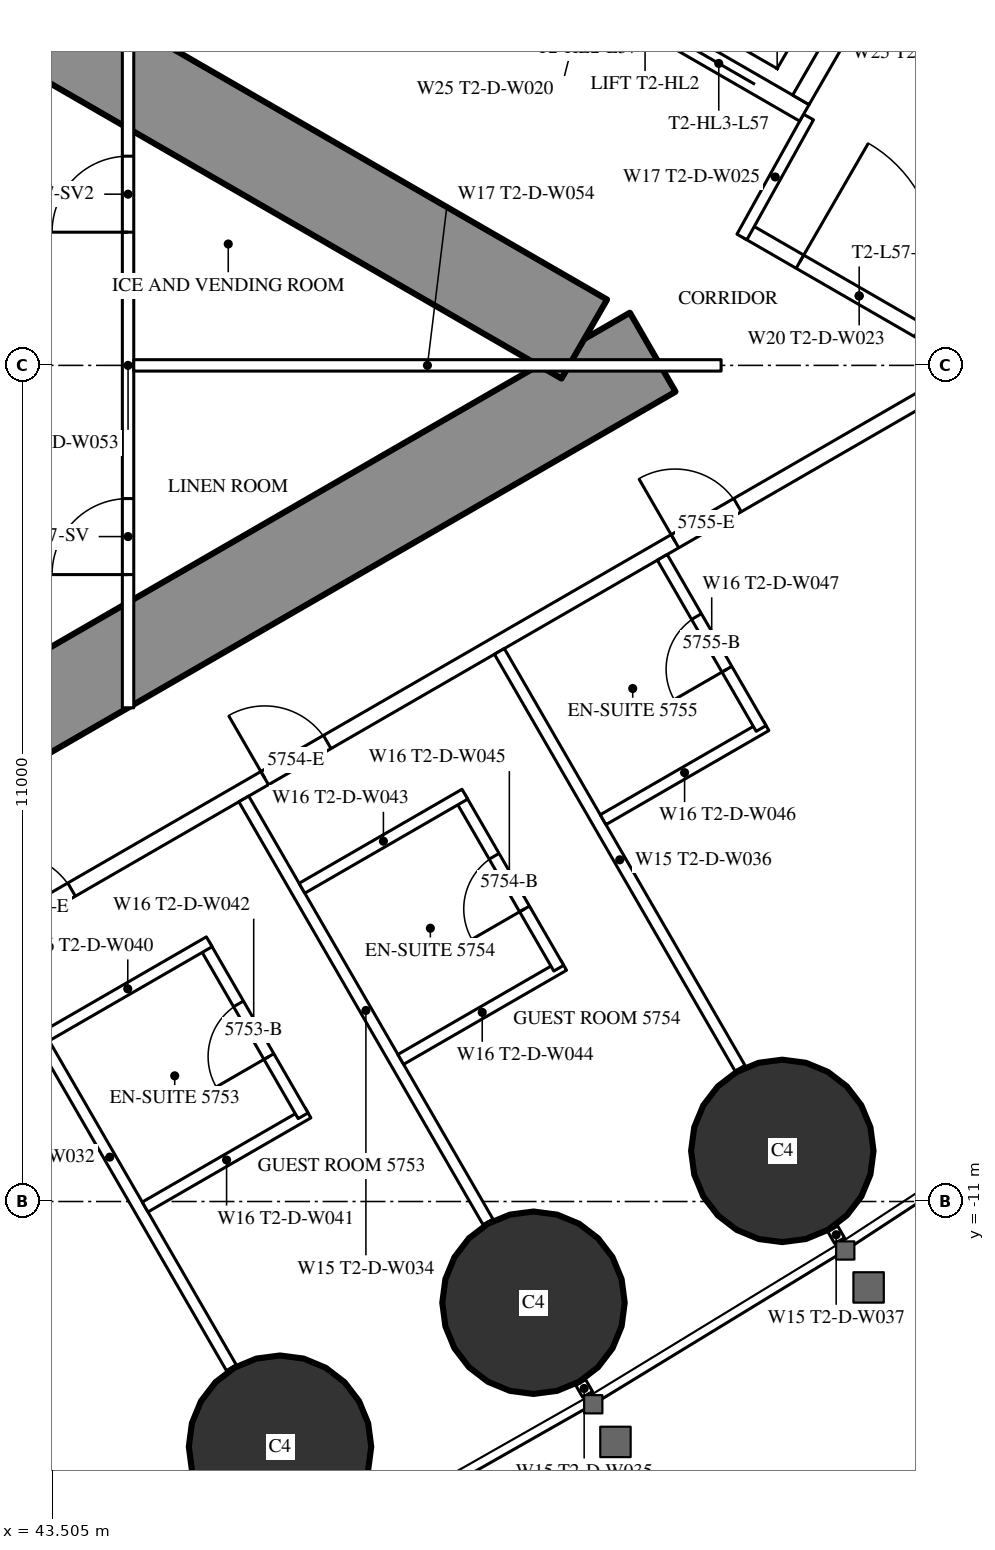
"""IFC4 building model, lengths in metres.
Left out: names, types, materials, properties, quantities, classifications, styles, units other than length and angle.
Written with IfcOpenShell. Run it as: python <this file> out.ifc"""

import sys

from ifc_helpers import new_model, si_unit, direction, frame, frame_2d, origin, origin_2d, place, context, subcontext, project, spatial, rectangle, circle, extrude, element, fill, save


model = new_model("IFC4")
c1 = context("Model", 3, precision=1e-05, world=origin(), true_north=direction((0.0, 1.0)))
c2 = subcontext(c1, "Body", "Model", "MODEL_VIEW")
j1 = project(units=[si_unit("LENGTHUNIT", "METRE"), si_unit("PLANEANGLEUNIT", "RADIAN")], contexts=[c1])
p1 = place(None, origin())
s1 = spatial("IfcSite", under=j1, at=p1, CompositionType="ELEMENT")
p2 = place(p1, origin())
s2 = spatial("IfcBuilding", under=s1, at=p2, CompositionType="ELEMENT")
p3 = place(p2, frame((0.0, 0.0, 215.3)))
s3 = spatial("IfcBuildingStorey", under=s2, at=p3, CompositionType="ELEMENT", Elevation=215.3)
for number, where, z_axis, x_axis in (
    (1, (46.499, -14.226, 0.0), (0.0, 0.0, 1.0), (1.0, 0.0, 0.0)),
    (2, (49.834, -12.332, 0.0), (0.0, 0.0, 1.0), (1.0, 0.0, 0.0)),
    (3, (53.108, -10.334, 0.0), (0.0, 0.0, 1.0), (1.0, 0.0, 0.0)),
):
    element("IfcColumn", number, at=place(p3, frame(where, z_axis=z_axis, x_axis=x_axis)), inside=s3, PredefinedType="COLUMN", context=c2, shape_type="SweptSolid", body=[
        extrude(circle(Radius=1.2, at=origin_2d()), origin(), (0.0, 0.0, 1.0), 3.6),
    ])
p4 = place(p3, frame((27.2, -13.8, 0.0), z_axis=(0.0, 0.0, 1.0), x_axis=(0.866027159892, 0.499996958321, 0.0)))
e4 = element("IfcWall", 4, at=p4, inside=s3, PredefinedType="SHEAR", context=c2, shape_type="SweptSolid", body=[
    extrude(rectangle(XDim=27.947, YDim=1.2, at=frame_2d((13.973, 0.0))), origin(), (0.0, 0.0, 1.0), 3.6),
])
p5 = place(p4, frame((4.6, 0.0, 0.0)))
e5 = element("IfcOpeningElement", 5, at=p5, cuts=e4, PredefinedType="OPENING", context=c2, shape_type="SweptSolid", body=[
    extrude(rectangle(XDim=1.0, YDim=2.2, at=frame_2d((0.5, 1.1))), frame((0.0, 0.61, 0.0), z_axis=(0.0, -1.0, 0.0), x_axis=(1.0, 0.0, 0.0)), (0.0, 0.0, 1.0), 1.22),
])
p6 = place(p4, frame((13.395, 0.0, 0.0)))
e6 = element("IfcOpeningElement", 6, at=p6, cuts=e4, PredefinedType="OPENING", context=c2, shape_type="SweptSolid", body=[
    extrude(rectangle(XDim=1.8, YDim=2.2, at=frame_2d((0.9, 1.1))), frame((0.0, 0.61, 0.0), z_axis=(0.0, -1.0, 0.0), x_axis=(1.0, 0.0, 0.0)), (0.0, 0.0, 1.0), 1.22),
])
p7 = place(p3, frame((27.2, 13.8, 0.0), z_axis=(0.0, 0.0, 1.0), x_axis=(0.866024515034, -0.500001539357, 0.0)))
e7 = element("IfcWall", 7, at=p7, inside=s3, PredefinedType="SHEAR", context=c2, shape_type="SweptSolid", body=[
    extrude(rectangle(XDim=26.907, YDim=1.2, at=frame_2d((13.454, 0.0))), origin(), (0.0, 0.0, 1.0), 3.6),
])
p8 = place(p7, frame((4.6, 0.0, 0.0)))
e8 = element("IfcOpeningElement", 8, at=p8, cuts=e7, PredefinedType="OPENING", context=c2, shape_type="SweptSolid", body=[
    extrude(rectangle(XDim=1.0, YDim=2.2, at=frame_2d((0.5, 1.1))), frame((0.0, 0.61, 0.0), z_axis=(0.0, -1.0, 0.0), x_axis=(1.0, 0.0, 0.0)), (0.0, 0.0, 1.0), 1.22),
])
p9 = place(p7, frame((13.395, 0.0, 0.0)))
e9 = element("IfcOpeningElement", 9, at=p9, cuts=e7, PredefinedType="OPENING", context=c2, shape_type="SweptSolid", body=[
    extrude(rectangle(XDim=1.8, YDim=2.2, at=frame_2d((0.9, 1.1))), frame((0.0, 0.61, 0.0), z_axis=(0.0, -1.0, 0.0), x_axis=(1.0, 0.0, 0.0)), (0.0, 0.0, 1.0), 1.22),
])
p10 = place(p3, frame((28.959, -15.44, 0.0), z_axis=(0.0, 0.0, 1.0), x_axis=(0.866025227435, 0.500000305447, 0.0)))
e10 = element("IfcWall", 10, at=p10, inside=s3, PredefinedType="PARTITIONING", context=c2, shape_type="SweptSolid", body=[
    extrude(rectangle(XDim=30.88, YDim=0.2, at=frame_2d((15.44, 0.0))), origin(), (0.0, 0.0, 1.0), 3.35),
])
p11 = place(p10, frame((0.494, 0.0, 0.0)))
e11 = element("IfcOpeningElement", 11, at=p11, cuts=e10, PredefinedType="OPENING", context=c2, shape_type="SweptSolid", body=[
    extrude(rectangle(XDim=1.8, YDim=2.2, at=frame_2d((0.9, 1.1))), frame((0.0, 0.11, 0.0), z_axis=(0.0, -1.0, 0.0), x_axis=(1.0, 0.0, 0.0)), (0.0, 0.0, 1.0), 0.22),
])
p12 = place(p10, frame((7.687, 0.0, 0.0)))
e12 = element("IfcOpeningElement", 12, at=p12, cuts=e10, PredefinedType="OPENING", context=c2, shape_type="SweptSolid", body=[
    extrude(rectangle(XDim=1.0, YDim=2.2, at=frame_2d((0.5, 1.1))), frame((0.0, 0.11, 0.0), z_axis=(0.0, -1.0, 0.0), x_axis=(1.0, 0.0, 0.0)), (0.0, 0.0, 1.0), 0.22),
])
p13 = place(p10, frame((16.137, 0.0, 0.0)))
e13 = element("IfcOpeningElement", 13, at=p13, cuts=e10, PredefinedType="OPENING", context=c2, shape_type="SweptSolid", body=[
    extrude(rectangle(XDim=0.95, YDim=2.2, at=frame_2d((0.475, 1.1))), frame((0.0, 0.11, 0.0), z_axis=(0.0, -1.0, 0.0), x_axis=(1.0, 0.0, 0.0)), (0.0, 0.0, 1.0), 0.22),
])
p14 = place(p10, frame((20.021, 0.0, 0.0)))
e14 = element("IfcOpeningElement", 14, at=p14, cuts=e10, PredefinedType="OPENING", context=c2, shape_type="SweptSolid", body=[
    extrude(rectangle(XDim=0.95, YDim=2.2, at=frame_2d((0.475, 1.1))), frame((0.0, 0.11, 0.0), z_axis=(0.0, -1.0, 0.0), x_axis=(1.0, 0.0, 0.0)), (0.0, 0.0, 1.0), 0.22),
])
p15 = place(p10, frame((26.253, 0.0, 0.0)))
e15 = element("IfcOpeningElement", 15, at=p15, cuts=e10, PredefinedType="OPENING", context=c2, shape_type="SweptSolid", body=[
    extrude(rectangle(XDim=0.95, YDim=2.2, at=frame_2d((0.475, 1.1))), frame((0.0, 0.11, 0.0), z_axis=(0.0, -1.0, 0.0), x_axis=(1.0, 0.0, 0.0)), (0.0, 0.0, 1.0), 0.22),
])
p16 = place(p3, frame((42.66, -7.646, 0.0), z_axis=(0.0, 0.0, 1.0), x_axis=(0.499996592859, -0.866027370889, 0.0)))
e16 = element("IfcWall", 16, at=p16, inside=s3, PredefinedType="PARTITIONING", context=c2, shape_type="SweptSolid", body=[
    extrude(rectangle(XDim=6.398, YDim=0.15, at=frame_2d((3.199, 0.0))), origin(), (0.0, 0.0, 1.0), 2.45),
])
p17 = place(p3, frame((46.023, -5.704, 0.0), z_axis=(0.0, 0.0, 1.0), x_axis=(0.499984478165, -0.866034365135, 0.0)))
e17 = element("IfcWall", 17, at=p17, inside=s3, PredefinedType="PARTITIONING", context=c2, shape_type="SweptSolid", body=[
    extrude(rectangle(XDim=6.426, YDim=0.15, at=frame_2d((3.213, 0.0))), origin(), (0.0, 0.0, 1.0), 2.45),
])
p18 = place(p3, frame((50.456, -13.382, 0.0), z_axis=(0.0, 0.0, 1.0), x_axis=(0.500661834965, -0.865642955848, 0.0)))
e18 = element("IfcWall", 18, at=p18, inside=s3, PredefinedType="PARTITIONING", context=c2, shape_type="SweptSolid", body=[
    extrude(rectangle(XDim=0.18, YDim=0.15, at=frame_2d((0.09, 0.0))), origin(), (0.0, 0.0, 1.0), 2.45),
])
p19 = place(p3, frame((49.385, -3.763, 0.0), z_axis=(0.0, 0.0, 1.0), x_axis=(0.499999447814, -0.866025722589, 0.0)))
e19 = element("IfcWall", 19, at=p19, inside=s3, PredefinedType="PARTITIONING", context=c2, shape_type="SweptSolid", body=[
    extrude(rectangle(XDim=6.333, YDim=0.15, at=frame_2d((3.166, 0.0))), origin(), (0.0, 0.0, 1.0), 2.45),
])
p20 = place(p3, frame((53.771, -11.36, 0.0), z_axis=(0.0, 0.0, 1.0), x_axis=(0.499524978789, -0.866299483762, 0.0)))
e20 = element("IfcWall", 20, at=p20, inside=s3, PredefinedType="PARTITIONING", context=c2, shape_type="SweptSolid", body=[
    extrude(rectangle(XDim=0.178, YDim=0.15, at=frame_2d((0.089, 0.0))), origin(), (0.0, 0.0, 1.0), 2.45),
])
p21 = place(p3, frame((52.639, 1.769, 0.0), z_axis=(0.0, 0.0, 1.0), x_axis=(0.866027340901, -0.4999966448, 0.0)))
e21 = element("IfcWall", 21, at=p21, inside=s3, PredefinedType="PARTITIONING", context=c2, shape_type="SweptSolid", body=[
    extrude(rectangle(XDim=3.417, YDim=0.2, at=frame_2d((1.708, 0.0))), origin(), (0.0, 0.0, 1.0), 3.35),
])
p22 = place(p21, frame((0.809, 0.0, 0.0)))
e22 = element("IfcOpeningElement", 22, at=p22, cuts=e21, PredefinedType="OPENING", context=c2, shape_type="SweptSolid", body=[
    extrude(rectangle(XDim=1.8, YDim=2.2, at=frame_2d((0.9, 1.1))), frame((0.0, 0.11, 0.0), z_axis=(0.0, -1.0, 0.0), x_axis=(1.0, 0.0, 0.0)), (0.0, 0.0, 1.0), 0.22),
])
p23 = place(p3, frame((52.576, 1.689, 0.0), z_axis=(0.0, 0.0, 1.0), x_axis=(0.485424724123, 0.874278466629, 0.0)))
e23 = element("IfcWall", 23, at=p23, inside=s3, PredefinedType="PARTITIONING", context=c2, shape_type="SweptSolid", body=[
    extrude(rectangle(XDim=1.805, YDim=0.15, at=frame_2d((0.903, 0.0))), origin(), (0.0, 0.0, 1.0), 3.35),
])
p24 = place(p3, frame((44.725, -11.072, 0.0), z_axis=(0.0, 0.0, 1.0), x_axis=(0.866006523861, 0.500032699561, 0.0)))
e24 = element("IfcWall", 24, at=p24, inside=s3, PredefinedType="PARTITIONING", context=c2, shape_type="SweptSolid", body=[
    extrude(rectangle(XDim=2.475, YDim=0.15, at=frame_2d((1.237, 0.0))), origin(), (0.0, 0.0, 1.0), 3.35),
])
p25 = place(p3, frame((45.503, -7.621, 0.0), z_axis=(0.0, 0.0, 1.0), x_axis=(0.500006934395, -0.866021400173, 0.0)))
e25 = element("IfcWall", 25, at=p25, inside=s3, PredefinedType="PARTITIONING", context=c2, shape_type="SweptSolid", body=[
    extrude(rectangle(XDim=2.6, YDim=0.15, at=frame_2d((1.3, 0.0))), origin(), (0.0, 0.0, 1.0), 3.35),
])
p26 = place(p25, frame((0.9, 0.0, 0.0)))
e26 = element("IfcOpeningElement", 26, at=p26, cuts=e25, PredefinedType="OPENING", context=c2, shape_type="SweptSolid", body=[
    extrude(rectangle(XDim=0.8, YDim=2.2, at=frame_2d((0.4, 1.1))), frame((0.0, 0.085, 0.0), z_axis=(0.0, -1.0, 0.0), x_axis=(1.0, 0.0, 0.0)), (0.0, 0.0, 1.0), 0.17),
])
for number, where, z_axis, x_axis in (
    (27, (43.425, -8.821, 0.0), (0.0, 0.0, 1.0), (0.866, 0.5, 0.0)),
    (28, (48.088, -9.13, 0.0), (0.0, 0.0, 1.0), (0.866, 0.5, 0.0)),
):
    element("IfcWall", number, at=place(p3, frame(where, z_axis=z_axis, x_axis=x_axis)), inside=s3, PredefinedType="PARTITIONING", context=c2, shape_type="SweptSolid", body=[
        extrude(rectangle(XDim=2.475, YDim=0.15, at=frame_2d((1.237, 0.0))), origin(), (0.0, 0.0, 1.0), 3.35),
    ])
p27 = place(p3, frame((48.866, -5.679, 0.0), z_axis=(0.0, 0.0, 1.0), x_axis=(0.500006934395, -0.866021400173, 0.0)))
e29 = element("IfcWall", 29, at=p27, inside=s3, PredefinedType="PARTITIONING", context=c2, shape_type="SweptSolid", body=[
    extrude(rectangle(XDim=2.6, YDim=0.15, at=frame_2d((1.3, 0.0))), origin(), (0.0, 0.0, 1.0), 3.35),
])
p28 = place(p27, frame((0.9, 0.0, 0.0)))
e30 = element("IfcOpeningElement", 30, at=p28, cuts=e29, PredefinedType="OPENING", context=c2, shape_type="SweptSolid", body=[
    extrude(rectangle(XDim=0.8, YDim=2.2, at=frame_2d((0.4, 1.1))), frame((0.0, 0.085, 0.0), z_axis=(0.0, -1.0, 0.0), x_axis=(1.0, 0.0, 0.0)), (0.0, 0.0, 1.0), 0.17),
])
p29 = place(p3, frame((46.788, -6.879, 0.0), z_axis=(0.0, 0.0, 1.0), x_axis=(0.866006523861, 0.500032699561, 0.0)))
e31 = element("IfcWall", 31, at=p29, inside=s3, PredefinedType="PARTITIONING", context=c2, shape_type="SweptSolid", body=[
    extrude(rectangle(XDim=2.475, YDim=0.15, at=frame_2d((1.237, 0.0))), origin(), (0.0, 0.0, 1.0), 3.35),
])
p30 = place(p3, frame((50.75, -5.977, 0.0), z_axis=(0.0, 0.0, 1.0), x_axis=(0.866031185235, 0.4999899861, 0.0)))
e32 = element("IfcWall", 32, at=p30, inside=s3, PredefinedType="PARTITIONING", context=c2, shape_type="SweptSolid", body=[
    extrude(rectangle(XDim=2.475, YDim=0.15, at=frame_2d((1.238, 0.0))), origin(), (0.0, 0.0, 1.0), 3.35),
])
p31 = place(p3, frame((51.529, -2.525, 0.0), z_axis=(0.0, 0.0, 1.0), x_axis=(0.500006934395, -0.866021400173, 0.0)))
e33 = element("IfcWall", 33, at=p31, inside=s3, PredefinedType="PARTITIONING", context=c2, shape_type="SweptSolid", body=[
    extrude(rectangle(XDim=2.6, YDim=0.15, at=frame_2d((1.3, 0.0))), origin(), (0.0, 0.0, 1.0), 3.35),
])
p32 = place(p31, frame((0.9, 0.0, 0.0)))
e34 = element("IfcOpeningElement", 34, at=p32, cuts=e33, PredefinedType="OPENING", context=c2, shape_type="SweptSolid", body=[
    extrude(rectangle(XDim=0.8, YDim=2.2, at=frame_2d((0.4, 1.1))), frame((0.0, 0.085, 0.0), z_axis=(0.0, -1.0, 0.0), x_axis=(1.0, 0.0, 0.0)), (0.0, 0.0, 1.0), 0.17),
])
p33 = place(p3, frame((44.5, -4.505, 0.0), z_axis=(0.0, 0.0, 1.0), x_axis=(0.0, 1.0, 0.0)))
e35 = element("IfcWall", 35, at=p33, inside=s3, PredefinedType="PARTITIONING", context=c2, shape_type="SweptSolid", body=[
    extrude(rectangle(XDim=9.009, YDim=0.15, at=frame_2d((4.505, 0.0))), origin(), (0.0, 0.0, 1.0), 3.35),
])
p34 = place(p33, frame((1.752, 0.0, 0.0)))
e36 = element("IfcOpeningElement", 36, at=p34, cuts=e35, PredefinedType="OPENING", context=c2, shape_type="SweptSolid", body=[
    extrude(rectangle(XDim=1.0, YDim=2.2, at=frame_2d((0.5, 1.1))), frame((0.0, 0.085, 0.0), z_axis=(0.0, -1.0, 0.0), x_axis=(1.0, 0.0, 0.0)), (0.0, 0.0, 1.0), 0.17),
])
p35 = place(p33, frame((6.257, 0.0, 0.0)))
e37 = element("IfcOpeningElement", 37, at=p35, cuts=e35, PredefinedType="OPENING", context=c2, shape_type="SweptSolid", body=[
    extrude(rectangle(XDim=1.0, YDim=2.2, at=frame_2d((0.5, 1.1))), frame((0.0, 0.085, 0.0), z_axis=(0.0, -1.0, 0.0), x_axis=(1.0, 0.0, 0.0)), (0.0, 0.0, 1.0), 0.17),
])
p36 = place(p3, frame((44.575, 0.0, 0.0), z_axis=(0.0, 0.0, 1.0), x_axis=(1.0, 0.0, 0.0)))
e38 = element("IfcWall", 38, at=p36, inside=s3, PredefinedType="PARTITIONING", context=c2, shape_type="SweptSolid", body=[
    extrude(rectangle(XDim=7.727, YDim=0.15, at=frame_2d((3.864, 0.0))), origin(), (0.0, 0.0, 1.0), 2.45),
])
p37 = place(p3, frame((47.681, 6.622, 0.0), z_axis=(0.0, 0.0, 1.0), x_axis=(0.86603344179, -0.499986077507, 0.0)))
e39 = element("IfcWall", 39, at=p37, inside=s3, PredefinedType="PARTITIONING", context=c2, shape_type="SweptSolid", body=[
    extrude(rectangle(XDim=6.6, YDim=0.25, at=frame_2d((3.3, 0.0))), origin(), (0.0, 0.0, 1.0), 3.35),
])
p38 = place(p37, frame((0.75, 0.0, 0.0)))
e40 = element("IfcOpeningElement", 40, at=p38, cuts=e39, PredefinedType="OPENING", context=c2, shape_type="SweptSolid", body=[
    extrude(rectangle(XDim=1.1, YDim=2.2, at=frame_2d((0.55, 1.1))), frame((0.0, 0.135, 0.0), z_axis=(0.0, -1.0, 0.0), x_axis=(1.0, 0.0, 0.0)), (0.0, 0.0, 1.0), 0.27),
])
p39 = place(p37, frame((2.75, 0.0, 0.0)))
e41 = element("IfcOpeningElement", 41, at=p39, cuts=e39, PredefinedType="OPENING", context=c2, shape_type="SweptSolid", body=[
    extrude(rectangle(XDim=1.1, YDim=2.2, at=frame_2d((0.55, 1.1))), frame((0.0, 0.135, 0.0), z_axis=(0.0, -1.0, 0.0), x_axis=(1.0, 0.0, 0.0)), (0.0, 0.0, 1.0), 0.27),
])
p40 = place(p37, frame((4.75, 0.0, 0.0)))
e42 = element("IfcOpeningElement", 42, at=p40, cuts=e39, PredefinedType="OPENING", context=c2, shape_type="SweptSolid", body=[
    extrude(rectangle(XDim=1.1, YDim=2.2, at=frame_2d((0.55, 1.1))), frame((0.0, 0.135, 0.0), z_axis=(0.0, -1.0, 0.0), x_axis=(1.0, 0.0, 0.0)), (0.0, 0.0, 1.0), 0.27),
])
p41 = place(p3, frame((53.352, 3.493, 0.0), z_axis=(0.0, 0.0, 1.0), x_axis=(0.499872130319, 0.866099216793, 0.0)))
e43 = element("IfcWall", 43, at=p41, inside=s3, PredefinedType="PARTITIONING", context=c2, shape_type="SweptSolid", body=[
    extrude(rectangle(XDim=3.2, YDim=0.25, at=frame_2d((1.6, 0.0))), origin(), (0.0, 0.0, 1.0), 3.35),
])
p42 = place(p26, origin())
e44 = element("IfcDoor", 44, at=p42, inside=s3, OperationType="SINGLE_SWING_RIGHT", PredefinedType="DOOR", context=c2, shape_type="SweptSolid", body=[
    extrude(rectangle(XDim=0.8, YDim=2.2, at=frame_2d((0.4, 1.1))), frame((0.0, 0.025, 0.0), z_axis=(0.0, -1.0, 0.0), x_axis=(1.0, 0.0, 0.0)), (0.0, 0.0, 1.0), 0.05),
])
fill(e26, e44)
p43 = place(p13, origin())
e45 = element("IfcDoor", 45, at=p43, inside=s3, OperationType="SINGLE_SWING_LEFT", PredefinedType="DOOR", context=c2, shape_type="SweptSolid", body=[
    extrude(rectangle(XDim=0.95, YDim=2.2, at=frame_2d((0.475, 1.1))), frame((0.0, 0.025, 0.0), z_axis=(0.0, -1.0, 0.0), x_axis=(1.0, 0.0, 0.0)), (0.0, 0.0, 1.0), 0.05),
])
fill(e13, e45)
p44 = place(p28, origin())
e46 = element("IfcDoor", 46, at=p44, inside=s3, OperationType="SINGLE_SWING_RIGHT", PredefinedType="DOOR", context=c2, shape_type="SweptSolid", body=[
    extrude(rectangle(XDim=0.8, YDim=2.2, at=frame_2d((0.4, 1.1))), frame((0.0, 0.025, 0.0), z_axis=(0.0, -1.0, 0.0), x_axis=(1.0, 0.0, 0.0)), (0.0, 0.0, 1.0), 0.05),
])
fill(e30, e46)
p45 = place(p14, origin())
e47 = element("IfcDoor", 47, at=p45, inside=s3, OperationType="SINGLE_SWING_LEFT", PredefinedType="DOOR", context=c2, shape_type="SweptSolid", body=[
    extrude(rectangle(XDim=0.95, YDim=2.2, at=frame_2d((0.475, 1.1))), frame((0.0, 0.025, 0.0), z_axis=(0.0, -1.0, 0.0), x_axis=(1.0, 0.0, 0.0)), (0.0, 0.0, 1.0), 0.05),
])
fill(e14, e47)
p46 = place(p32, origin())
e48 = element("IfcDoor", 48, at=p46, inside=s3, OperationType="SINGLE_SWING_RIGHT", PredefinedType="DOOR", context=c2, shape_type="SweptSolid", body=[
    extrude(rectangle(XDim=0.8, YDim=2.2, at=frame_2d((0.4, 1.1))), frame((0.0, 0.025, 0.0), z_axis=(0.0, -1.0, 0.0), x_axis=(1.0, 0.0, 0.0)), (0.0, 0.0, 1.0), 0.05),
])
fill(e34, e48)
p47 = place(p15, origin())
e49 = element("IfcDoor", 49, at=p47, inside=s3, OperationType="SINGLE_SWING_LEFT", PredefinedType="DOOR", context=c2, shape_type="SweptSolid", body=[
    extrude(rectangle(XDim=0.95, YDim=2.2, at=frame_2d((0.475, 1.1))), frame((0.0, 0.025, 0.0), z_axis=(0.0, -1.0, 0.0), x_axis=(1.0, 0.0, 0.0)), (0.0, 0.0, 1.0), 0.05),
])
fill(e15, e49)
p48 = place(p22, origin())
e50 = element("IfcDoor", 50, at=p48, inside=s3, OperationType="DOUBLE_DOOR_SINGLE_SWING", PredefinedType="DOOR", context=c2, shape_type="SweptSolid", body=[
    extrude(rectangle(XDim=1.8, YDim=2.2, at=frame_2d((0.9, 1.1))), frame((0.0, 0.025, 0.0), z_axis=(0.0, -1.0, 0.0), x_axis=(1.0, 0.0, 0.0)), (0.0, 0.0, 1.0), 0.05),
])
fill(e22, e50)
p49 = place(p34, origin())
e51 = element("IfcDoor", 51, at=p49, inside=s3, OperationType="SINGLE_SWING_LEFT", PredefinedType="DOOR", context=c2, shape_type="SweptSolid", body=[
    extrude(rectangle(XDim=1.0, YDim=2.2, at=frame_2d((0.5, 1.1))), frame((0.0, 0.025, 0.0), z_axis=(0.0, -1.0, 0.0), x_axis=(1.0, 0.0, 0.0)), (0.0, 0.0, 1.0), 0.05),
])
fill(e36, e51)
p50 = place(p35, origin())
e52 = element("IfcDoor", 52, at=p50, inside=s3, OperationType="SINGLE_SWING_LEFT", PredefinedType="DOOR", context=c2, shape_type="SweptSolid", body=[
    extrude(rectangle(XDim=1.0, YDim=2.2, at=frame_2d((0.5, 1.1))), frame((0.0, 0.025, 0.0), z_axis=(0.0, -1.0, 0.0), x_axis=(1.0, 0.0, 0.0)), (0.0, 0.0, 1.0), 0.05),
])
fill(e37, e52)
p51 = place(p40, origin())
e53 = element("IfcDoor", 53, at=p51, inside=s3, OperationType="DOUBLE_DOOR_SLIDING", PredefinedType="USERDEFINED", context=c2, shape_type="SweptSolid", body=[
    extrude(rectangle(XDim=1.1, YDim=2.2, at=frame_2d((0.55, 1.1))), frame((0.0, 0.025, 0.0), z_axis=(0.0, -1.0, 0.0), x_axis=(1.0, 0.0, 0.0)), (0.0, 0.0, 1.0), 0.05),
])
fill(e42, e53)
save(model, sys.argv[1])
